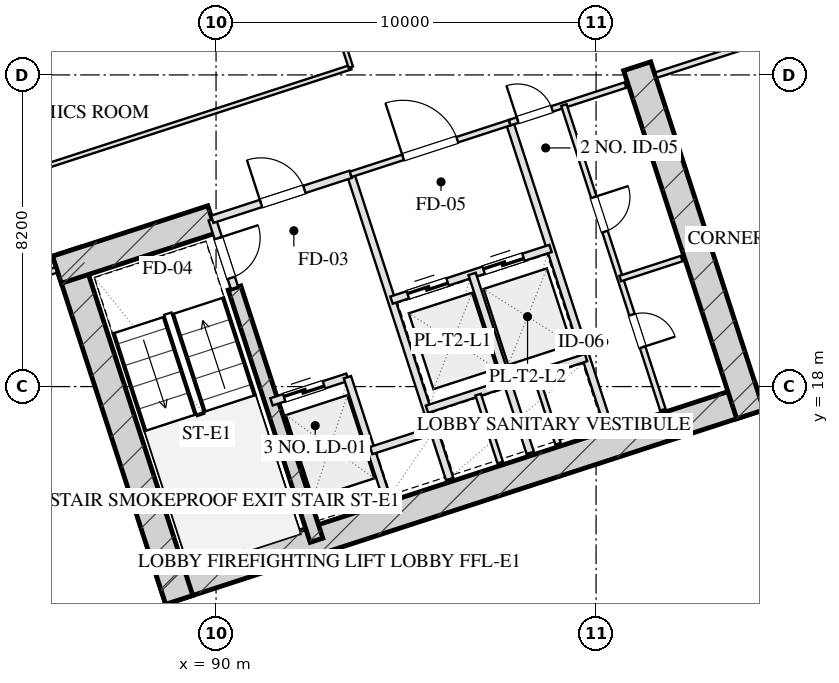
"""IFC4 building model, lengths in metres.
Left out: names, types, materials, properties, quantities, classifications, styles, units other than length and angle.
Written with IfcOpenShell. Run it as: python <this file> out.ifc"""

import sys

from ifc_helpers import new_model, si_unit, direction, frame, frame_2d, origin, place, context, subcontext, project, spatial, rectangle, extrude, element, fill, save


model = new_model("IFC4")
c1 = context("Model", 3, precision=1e-05, world=origin(), true_north=direction((0.0, 1.0)))
c2 = subcontext(c1, "Body", "Model", "MODEL_VIEW")
j1 = project(units=[si_unit("LENGTHUNIT", "METRE"), si_unit("PLANEANGLEUNIT", "RADIAN")], contexts=[c1])
p1 = place(None, origin())
s1 = spatial("IfcSite", under=j1, at=p1, CompositionType="ELEMENT")
p2 = place(p1, origin())
s2 = spatial("IfcBuilding", under=s1, at=p2, CompositionType="ELEMENT")
p3 = place(p2, frame((0.0, 0.0, 88.55)))
s3 = spatial("IfcBuildingStorey", under=s2, at=p3, CompositionType="ELEMENT", Elevation=88.55)
p4 = place(p3, frame((88.559, 12.629, 0.0), z_axis=(0.0, 0.0, 1.0), x_axis=(0.951056072937, 0.309018358888, 0.0)))
e1 = element("IfcWall", 1, at=p4, inside=s3, PredefinedType="SHEAR", context=c2, shape_type="SweptSolid", body=[
    extrude(rectangle(XDim=16.55, YDim=0.75, at=frame_2d((8.275, 0.0))), origin(), (0.0, 0.0, 1.0), 3.45),
])
p5 = place(p3, frame((86.055, 21.546, 0.0), z_axis=(0.0, 0.0, 1.0), x_axis=(0.309023585745, -0.951054374604, 0.0)))
e2 = element("IfcWall", 2, at=p5, inside=s3, PredefinedType="SHEAR", context=c2, shape_type="SweptSolid", body=[
    extrude(rectangle(XDim=9.63, YDim=0.75, at=frame_2d((4.815, 0.0))), origin(), (0.0, 0.0, 1.0), 3.45),
])
p6 = place(p3, frame((101.082, 26.429, 0.0), z_axis=(0.0, 0.0, 1.0), x_axis=(0.309016134813, -0.951056795583, 0.0)))
e3 = element("IfcWall", 3, at=p6, inside=s3, PredefinedType="SHEAR", context=c2, shape_type="SweptSolid", body=[
    extrude(rectangle(XDim=9.63, YDim=0.75, at=frame_2d((4.815, 0.0))), origin(), (0.0, 0.0, 1.0), 3.45),
])
p7 = place(p3, frame((90.486, 20.594, 0.0), z_axis=(0.0, 0.0, 1.0), x_axis=(0.309020428229, -0.951055400562, 0.0)))
e4 = element("IfcWall", 4, at=p7, inside=s3, PredefinedType="SHEAR", context=c2, shape_type="SweptSolid", body=[
    extrude(rectangle(XDim=6.98, YDim=0.35, at=frame_2d((3.49, 0.0))), origin(), (0.0, 0.0, 1.0), 3.45),
])
p8 = place(p3, frame((85.814, 21.074, 0.0), z_axis=(0.0, 0.0, 1.0), x_axis=(0.95106580992, 0.308988390074, 0.0)))
e5 = element("IfcWall", 5, at=p8, inside=s3, PredefinedType="SHEAR", context=c2, shape_type="SweptSolid", body=[
    extrude(rectangle(XDim=4.295, YDim=0.75, at=frame_2d((2.147, 0.0))), origin(), (0.0, 0.0, 1.0), 3.45),
])
p9 = place(p3, frame((99.284, 61.41, 0.0), z_axis=(0.0, 0.0, 1.0), x_axis=(0.309017542002, -0.95105633836, 0.0)))
e6 = element("IfcWall", 6, at=p9, inside=s3, PredefinedType="SOLIDWALL", context=c2, shape_type="SweptSolid", body=[
    extrude(rectangle(XDim=46.4, YDim=0.4, at=frame_2d((23.2, 0.0))), origin(), (0.0, 0.0, 1.0), 2.55),
])
p10 = place(p9, frame((19.4, 0.0, 0.75)))
e7 = element("IfcOpeningElement", 7, at=p10, cuts=e6, PredefinedType="OPENING", context=c2, shape_type="SweptSolid", body=[
    extrude(rectangle(XDim=2.4, YDim=1.4, at=frame_2d((1.2, 0.7))), frame((0.0, 0.21, 0.0), z_axis=(0.0, -1.0, 0.0), x_axis=(1.0, 0.0, 0.0)), (0.0, 0.0, 1.0), 0.42),
])
p11 = place(p9, frame((15.6, 0.0, 0.75)))
e8 = element("IfcOpeningElement", 8, at=p11, cuts=e6, PredefinedType="OPENING", context=c2, shape_type="SweptSolid", body=[
    extrude(rectangle(XDim=2.4, YDim=1.4, at=frame_2d((1.2, 0.7))), frame((0.0, 0.21, 0.0), z_axis=(0.0, -1.0, 0.0), x_axis=(1.0, 0.0, 0.0)), (0.0, 0.0, 1.0), 0.42),
])
p12 = place(p9, frame((27.05, 0.0, 0.0)))
e9 = element("IfcOpeningElement", 9, at=p12, cuts=e6, PredefinedType="OPENING", context=c2, shape_type="SweptSolid", body=[
    extrude(rectangle(XDim=1.1, YDim=2.15, at=frame_2d((0.55, 1.075))), frame((0.0, 0.21, 0.0), z_axis=(0.0, -1.0, 0.0), x_axis=(1.0, 0.0, 0.0)), (0.0, 0.0, 1.0), 0.42),
])
p13 = place(p3, frame((111.953, 14.005, 0.0), z_axis=(0.0, 0.0, 1.0), x_axis=(-0.95105505922, -0.309021478754, 0.0)))
e10 = element("IfcWall", 10, at=p13, inside=s3, PredefinedType="SOLIDWALL", context=c2, shape_type="SweptSolid", body=[
    extrude(rectangle(XDim=29.4, YDim=0.4, at=frame_2d((14.7, 0.0))), origin(), (0.0, 0.0, 1.0), 2.55),
])
p14 = place(p3, frame((89.899, 22.401, 0.0), z_axis=(0.0, 0.0, 1.0), x_axis=(0.308932062672, -0.951084108086, 0.0)))
e11 = element("IfcWall", 11, at=p14, inside=s3, PredefinedType="PARTITIONING", context=c2, shape_type="SweptSolid", body=[
    extrude(rectangle(XDim=1.9, YDim=0.2, at=frame_2d((0.95, 0.0))), origin(), (0.0, 0.0, 1.0), 3.155),
])
p15 = place(p14, frame((0.52, 0.0, 0.0)))
e12 = element("IfcOpeningElement", 12, at=p15, cuts=e11, PredefinedType="OPENING", context=c2, shape_type="SweptSolid", body=[
    extrude(rectangle(XDim=1.1, YDim=2.05, at=frame_2d((0.55, 1.025))), frame((0.0, 0.11, 0.0), z_axis=(0.0, -1.0, 0.0), x_axis=(1.0, 0.0, 0.0)), (0.0, 0.0, 1.0), 0.22),
])
p16 = place(p3, frame((93.542, 23.585, 0.0), z_axis=(0.0, 0.0, 1.0), x_axis=(0.309042196757, -0.951048327176, 0.0)))
e13 = element("IfcWall", 13, at=p16, inside=s3, PredefinedType="PARTITIONING", context=c2, shape_type="SweptSolid", body=[
    extrude(rectangle(XDim=8.43, YDim=0.2, at=frame_2d((4.215, 0.0))), origin(), (0.0, 0.0, 1.0), 3.155),
])
p17 = place(p3, frame((89.899, 22.401, 0.0), z_axis=(0.0, 0.0, 1.0), x_axis=(0.951046716504, 0.309047153403, 0.0)))
e14 = element("IfcWall", 14, at=p17, inside=s3, PredefinedType="PARTITIONING", context=c2, shape_type="SweptSolid", body=[
    extrude(rectangle(XDim=3.83, YDim=0.2, at=frame_2d((1.915, 0.0))), origin(), (0.0, 0.0, 1.0), 3.155),
])
p18 = place(p17, frame((1.35, 0.0, 0.0)))
e15 = element("IfcOpeningElement", 15, at=p18, cuts=e14, PredefinedType="OPENING", context=c2, shape_type="SweptSolid", body=[
    extrude(rectangle(XDim=1.2, YDim=2.05, at=frame_2d((0.6, 1.025))), frame((0.0, 0.11, 0.0), z_axis=(0.0, -1.0, 0.0), x_axis=(1.0, 0.0, 0.0)), (0.0, 0.0, 1.0), 0.22),
])
p19 = place(p3, frame((91.46, 17.598, 0.0), z_axis=(0.0, 0.0, 1.0), x_axis=(0.951062257173, 0.308999325213, 0.0)))
e16 = element("IfcWall", 16, at=p19, inside=s3, PredefinedType="PARTITIONING", context=c2, shape_type="SweptSolid", body=[
    extrude(rectangle(XDim=2.1, YDim=0.2, at=frame_2d((1.05, 0.0))), origin(), (0.0, 0.0, 1.0), 3.155),
])
p20 = place(p19, frame((0.35, 0.0, 0.0)))
e17 = element("IfcOpeningElement", 17, at=p20, cuts=e16, PredefinedType="OPENING", context=c2, shape_type="SweptSolid", body=[
    extrude(rectangle(XDim=1.1, YDim=2.05, at=frame_2d((0.55, 1.025))), frame((0.0, 0.11, 0.0), z_axis=(0.0, -1.0, 0.0), x_axis=(1.0, 0.0, 0.0)), (0.0, 0.0, 1.0), 0.22),
])
p21 = place(p3, frame((93.457, 18.247, 0.0), z_axis=(0.0, 0.0, 1.0), x_axis=(0.3089935693, -0.951064127245, 0.0)))
e18 = element("IfcWall", 18, at=p21, inside=s3, PredefinedType="PARTITIONING", context=c2, shape_type="SweptSolid", body=[
    extrude(rectangle(XDim=3.7, YDim=0.2, at=frame_2d((1.85, 0.0))), origin(), (0.0, 0.0, 1.0), 3.155),
])
p22 = place(p3, frame((94.084, 16.317, 0.0), z_axis=(0.0, 0.0, 1.0), x_axis=(0.951041328149, 0.309063734775, 0.0)))
e19 = element("IfcWall", 19, at=p22, inside=s3, PredefinedType="PARTITIONING", context=c2, shape_type="SweptSolid", body=[
    extrude(rectangle(XDim=1.73, YDim=0.2, at=frame_2d((0.865, 0.0))), origin(), (0.0, 0.0, 1.0), 3.155),
])
p23 = place(p3, frame((97.727, 24.944, 0.0), z_axis=(0.0, 0.0, 1.0), x_axis=(0.309016001439, -0.951056838919, 0.0)))
e20 = element("IfcWall", 20, at=p23, inside=s3, PredefinedType="PARTITIONING", context=c2, shape_type="SweptSolid", body=[
    extrude(rectangle(XDim=8.43, YDim=0.2, at=frame_2d((4.215, 0.0))), origin(), (0.0, 0.0, 1.0), 3.155),
])
p24 = place(p3, frame((93.542, 23.585, 0.0), z_axis=(0.0, 0.0, 1.0), x_axis=(0.951063829732, 0.308994485023, 0.0)))
e21 = element("IfcWall", 21, at=p24, inside=s3, PredefinedType="PARTITIONING", context=c2, shape_type="SweptSolid", body=[
    extrude(rectangle(XDim=4.4, YDim=0.15, at=frame_2d((2.2, 0.0))), origin(), (0.0, 0.0, 1.0), 3.155),
])
p25 = place(p24, frame((1.45, 0.0, 0.0)))
e22 = element("IfcOpeningElement", 22, at=p25, cuts=e21, PredefinedType="OPENING", context=c2, shape_type="SweptSolid", body=[
    extrude(rectangle(XDim=1.5, YDim=2.05, at=frame_2d((0.75, 1.025))), frame((0.0, 0.085, 0.0), z_axis=(0.0, -1.0, 0.0), x_axis=(1.0, 0.0, 0.0)), (0.0, 0.0, 1.0), 0.17),
])
p26 = place(p3, frame((94.617, 20.275, 0.0), z_axis=(0.0, 0.0, 1.0), x_axis=(0.951058531764, 0.30901079133, 0.0)))
e23 = element("IfcWall", 23, at=p26, inside=s3, PredefinedType="PARTITIONING", context=c2, shape_type="SweptSolid", body=[
    extrude(rectangle(XDim=4.4, YDim=0.2, at=frame_2d((2.2, 0.0))), origin(), (0.0, 0.0, 1.0), 3.155),
])
p27 = place(p26, frame((0.45, 0.0, 0.0)))
e24 = element("IfcOpeningElement", 24, at=p27, cuts=e23, PredefinedType="OPENING", context=c2, shape_type="SweptSolid", body=[
    extrude(rectangle(XDim=1.1, YDim=2.05, at=frame_2d((0.55, 1.025))), frame((0.0, 0.11, 0.0), z_axis=(0.0, -1.0, 0.0), x_axis=(1.0, 0.0, 0.0)), (0.0, 0.0, 1.0), 0.22),
])
p28 = place(p26, frame((2.55, 0.0, 0.0)))
e25 = element("IfcOpeningElement", 25, at=p28, cuts=e23, PredefinedType="OPENING", context=c2, shape_type="SweptSolid", body=[
    extrude(rectangle(XDim=1.1, YDim=2.05, at=frame_2d((0.55, 1.025))), frame((0.0, 0.11, 0.0), z_axis=(0.0, -1.0, 0.0), x_axis=(1.0, 0.0, 0.0)), (0.0, 0.0, 1.0), 0.22),
])
p29 = place(p3, frame((96.738, 20.964, 0.0), z_axis=(0.0, 0.0, 1.0), x_axis=(0.309042578481, -0.951048203135, 0.0)))
e26 = element("IfcWall", 26, at=p29, inside=s3, PredefinedType="PARTITIONING", context=c2, shape_type="SweptSolid", body=[
    extrude(rectangle(XDim=4.95, YDim=0.2, at=frame_2d((2.475, 0.0))), origin(), (0.0, 0.0, 1.0), 3.155),
])
p30 = place(p3, frame((95.551, 17.403, 0.0), z_axis=(0.0, 0.0, 1.0), x_axis=(0.951058531764, 0.30901079133, 0.0)))
e27 = element("IfcWall", 27, at=p30, inside=s3, PredefinedType="PARTITIONING", context=c2, shape_type="SweptSolid", body=[
    extrude(rectangle(XDim=4.4, YDim=0.2, at=frame_2d((2.2, 0.0))), origin(), (0.0, 0.0, 1.0), 3.155),
])
p31 = place(p3, frame((96.897, 17.788, 0.0), z_axis=(0.0, 0.0, 1.0), x_axis=(0.30897153969, -0.951071284217, 0.0)))
e28 = element("IfcWall", 28, at=p31, inside=s3, PredefinedType="PARTITIONING", context=c2, shape_type="SweptSolid", body=[
    extrude(rectangle(XDim=1.88, YDim=0.15, at=frame_2d((0.94, 0.0))), origin(), (0.0, 0.0, 1.0), 3.155),
])
p32 = place(p3, frame((98.419, 18.282, 0.0), z_axis=(0.0, 0.0, 1.0), x_axis=(0.308933380006, -0.951083680187, 0.0)))
e29 = element("IfcWall", 29, at=p32, inside=s3, PredefinedType="PARTITIONING", context=c2, shape_type="SweptSolid", body=[
    extrude(rectangle(XDim=1.88, YDim=0.15, at=frame_2d((0.94, 0.0))), origin(), (0.0, 0.0, 1.0), 3.155),
])
p33 = place(p3, frame((97.727, 24.944, 0.0), z_axis=(0.0, 0.0, 1.0), x_axis=(0.951036872128, 0.309077446369, 0.0)))
e30 = element("IfcWall", 30, at=p33, inside=s3, PredefinedType="PARTITIONING", context=c2, shape_type="SweptSolid", body=[
    extrude(rectangle(XDim=3.2, YDim=0.15, at=frame_2d((1.6, 0.0))), origin(), (0.0, 0.0, 1.0), 3.155),
])
p34 = place(p33, frame((0.22, 0.0, 0.0)))
e31 = element("IfcOpeningElement", 31, at=p34, cuts=e30, PredefinedType="OPENING", context=c2, shape_type="SweptSolid", body=[
    extrude(rectangle(XDim=0.95, YDim=2.05, at=frame_2d((0.475, 1.025))), frame((0.0, 0.085, 0.0), z_axis=(0.0, -1.0, 0.0), x_axis=(1.0, 0.0, 0.0)), (0.0, 0.0, 1.0), 0.17),
])
p35 = place(p3, frame((99.153, 25.408, 0.0), z_axis=(0.0, 0.0, 1.0), x_axis=(0.309016001439, -0.951056838919, 0.0)))
e32 = element("IfcWall", 32, at=p35, inside=s3, PredefinedType="PARTITIONING", context=c2, shape_type="SweptSolid", body=[
    extrude(rectangle(XDim=8.43, YDim=0.15, at=frame_2d((4.215, 0.0))), origin(), (0.0, 0.0, 1.0), 3.155),
])
p36 = place(p35, frame((2.55, 0.0, 0.0)))
e33 = element("IfcOpeningElement", 33, at=p36, cuts=e32, PredefinedType="OPENING", context=c2, shape_type="SweptSolid", body=[
    extrude(rectangle(XDim=0.95, YDim=2.05, at=frame_2d((0.475, 1.025))), frame((0.0, 0.085, 0.0), z_axis=(0.0, -1.0, 0.0), x_axis=(1.0, 0.0, 0.0)), (0.0, 0.0, 1.0), 0.17),
])
p37 = place(p35, frame((5.8, 0.0, 0.0)))
e34 = element("IfcOpeningElement", 34, at=p37, cuts=e32, PredefinedType="OPENING", context=c2, shape_type="SweptSolid", body=[
    extrude(rectangle(XDim=0.9, YDim=2.05, at=frame_2d((0.45, 1.025))), frame((0.0, 0.085, 0.0), z_axis=(0.0, -1.0, 0.0), x_axis=(1.0, 0.0, 0.0)), (0.0, 0.0, 1.0), 0.17),
])
p38 = place(p3, frame((100.636, 20.843, 0.0), z_axis=(0.0, 0.0, 1.0), x_axis=(0.951040401051, 0.309066587596, 0.0)))
e35 = element("IfcWall", 35, at=p38, inside=s3, PredefinedType="PARTITIONING", context=c2, shape_type="SweptSolid", body=[
    extrude(rectangle(XDim=1.7, YDim=0.15, at=frame_2d((0.85, 0.0))), origin(), (0.0, 0.0, 1.0), 3.155),
])
p39 = place(p3, frame((77.136, 18.254, 0.0), z_axis=(0.0, 0.0, 1.0), x_axis=(0.951057133767, 0.309015093986, 0.0)))
e36 = element("IfcWall", 36, at=p39, inside=s3, PredefinedType="PARTITIONING", context=c2, shape_type="SweptSolid", body=[
    extrude(rectangle(XDim=9.1, YDim=0.15, at=frame_2d((4.55, 0.0))), origin(), (0.0, 0.0, 1.0), 3.155),
])
p40 = place(p39, frame((3.822, 0.0, 0.0)))
e37 = element("IfcOpeningElement", 37, at=p40, cuts=e36, PredefinedType="OPENING", context=c2, shape_type="SweptSolid", body=[
    extrude(rectangle(XDim=1.0, YDim=2.05, at=frame_2d((0.5, 1.025))), frame((0.0, 0.085, 0.0), z_axis=(0.0, -1.0, 0.0), x_axis=(1.0, 0.0, 0.0)), (0.0, 0.0, 1.0), 0.17),
])
p41 = place(p3, frame((101.578, 26.196, 0.0), z_axis=(0.0, 0.0, 1.0), x_axis=(0.951062770994, 0.308997743729, 0.0)))
e38 = element("IfcWall", 38, at=p41, inside=s3, PredefinedType="PARTITIONING", context=c2, shape_type="SweptSolid", body=[
    extrude(rectangle(XDim=8.5, YDim=0.15, at=frame_2d((4.25, 0.0))), origin(), (0.0, 0.0, 1.0), 3.155),
])
p42 = place(p41, frame((3.57, 0.0, 0.0)))
e39 = element("IfcOpeningElement", 39, at=p42, cuts=e38, PredefinedType="OPENING", context=c2, shape_type="SweptSolid", body=[
    extrude(rectangle(XDim=1.0, YDim=2.05, at=frame_2d((0.5, 1.025))), frame((0.0, 0.085, 0.0), z_axis=(0.0, -1.0, 0.0), x_axis=(1.0, 0.0, 0.0)), (0.0, 0.0, 1.0), 0.17),
])
p43 = place(p3, frame((76.308, 20.803, 0.0), z_axis=(0.0, 0.0, 1.0), x_axis=(0.951054952586, 0.309021806935, 0.0)))
e40 = element("IfcWall", 40, at=p43, inside=s3, PredefinedType="PARTITIONING", context=c2, shape_type="SweptSolid", body=[
    extrude(rectangle(XDim=18.125, YDim=0.12, at=frame_2d((9.062, 0.0))), origin(), (0.0, 0.0, 1.0), 3.155),
])
p44 = place(p3, frame((93.546, 26.404, 0.0), z_axis=(0.0, 0.0, 1.0), x_axis=(-0.309022042254, 0.951054876125, 0.0)))
e41 = element("IfcWall", 41, at=p44, inside=s3, PredefinedType="PARTITIONING", context=c2, shape_type="SweptSolid", body=[
    extrude(rectangle(XDim=16.64, YDim=0.12, at=frame_2d((8.32, 0.0))), origin(), (0.0, 0.0, 1.0), 3.155),
])
p45 = place(p44, frame((1.16, 0.0, 0.0)))
e42 = element("IfcOpeningElement", 42, at=p45, cuts=e41, PredefinedType="OPENING", context=c2, shape_type="SweptSolid", body=[
    extrude(rectangle(XDim=1.0, YDim=2.05, at=frame_2d((0.5, 1.025))), frame((0.0, 0.07, 0.0), z_axis=(0.0, -1.0, 0.0), x_axis=(1.0, 0.0, 0.0)), (0.0, 0.0, 1.0), 0.14),
])
p46 = place(p44, frame((4.72, 0.0, 0.0)))
e43 = element("IfcOpeningElement", 43, at=p46, cuts=e41, PredefinedType="OPENING", context=c2, shape_type="SweptSolid", body=[
    extrude(rectangle(XDim=0.85, YDim=2.05, at=frame_2d((0.425, 1.025))), frame((0.0, 0.07, 0.0), z_axis=(0.0, -1.0, 0.0), x_axis=(1.0, 0.0, 0.0)), (0.0, 0.0, 1.0), 0.14),
])
p47 = place(p44, frame((7.823, 0.0, 0.0)))
e44 = element("IfcOpeningElement", 44, at=p47, cuts=e41, PredefinedType="OPENING", context=c2, shape_type="SweptSolid", body=[
    extrude(rectangle(XDim=1.05, YDim=2.05, at=frame_2d((0.525, 1.025))), frame((0.0, 0.07, 0.0), z_axis=(0.0, -1.0, 0.0), x_axis=(1.0, 0.0, 0.0)), (0.0, 0.0, 1.0), 0.14),
])
p48 = place(p44, frame((10.69, 0.0, 0.0)))
e45 = element("IfcOpeningElement", 45, at=p48, cuts=e41, PredefinedType="OPENING", context=c2, shape_type="SweptSolid", body=[
    extrude(rectangle(XDim=1.0, YDim=2.05, at=frame_2d((0.5, 1.025))), frame((0.0, 0.07, 0.0), z_axis=(0.0, -1.0, 0.0), x_axis=(1.0, 0.0, 0.0)), (0.0, 0.0, 1.0), 0.14),
])
p49 = place(p44, frame((14.247, 0.0, 0.0)))
e46 = element("IfcOpeningElement", 46, at=p49, cuts=e41, PredefinedType="OPENING", context=c2, shape_type="SweptSolid", body=[
    extrude(rectangle(XDim=1.0, YDim=2.05, at=frame_2d((0.5, 1.025))), frame((0.0, 0.07, 0.0), z_axis=(0.0, -1.0, 0.0), x_axis=(1.0, 0.0, 0.0)), (0.0, 0.0, 1.0), 0.14),
])
p50 = place(p3, frame((75.282, 23.96, 0.0), z_axis=(0.0, 0.0, 1.0), x_axis=(0.951054952586, 0.309021806935, 0.0)))
e47 = element("IfcWall", 47, at=p50, inside=s3, PredefinedType="PARTITIONING", context=c2, shape_type="SweptSolid", body=[
    extrude(rectangle(XDim=18.125, YDim=0.12, at=frame_2d((9.062, 0.0))), origin(), (0.0, 0.0, 1.0), 3.155),
])
p51 = place(p15, origin())
e48 = element("IfcDoor", 48, at=p51, inside=s3, OperationType="SINGLE_SWING_LEFT", PredefinedType="DOOR", context=c2, shape_type="SweptSolid", body=[
    extrude(rectangle(XDim=1.1, YDim=2.05, at=frame_2d((0.55, 1.025))), frame((0.0, 0.025, 0.0), z_axis=(0.0, -1.0, 0.0), x_axis=(1.0, 0.0, 0.0)), (0.0, 0.0, 1.0), 0.05),
])
fill(e12, e48)
p52 = place(p18, origin())
e49 = element("IfcDoor", 49, at=p52, inside=s3, OperationType="SINGLE_SWING_LEFT", PredefinedType="DOOR", context=c2, shape_type="SweptSolid", body=[
    extrude(rectangle(XDim=1.2, YDim=2.05, at=frame_2d((0.6, 1.025))), frame((0.0, 0.025, 0.0), z_axis=(0.0, -1.0, 0.0), x_axis=(1.0, 0.0, 0.0)), (0.0, 0.0, 1.0), 0.05),
])
fill(e15, e49)
p53 = place(p20, origin())
e50 = element("IfcDoor", 50, at=p53, inside=s3, OperationType="DOUBLE_DOOR_SLIDING", PredefinedType="DOOR", context=c2, shape_type="SweptSolid", body=[
    extrude(rectangle(XDim=1.1, YDim=2.05, at=frame_2d((0.55, 1.025))), frame((0.0, 0.025, 0.0), z_axis=(0.0, -1.0, 0.0), x_axis=(1.0, 0.0, 0.0)), (0.0, 0.0, 1.0), 0.05),
])
fill(e17, e50)
p54 = place(p25, origin())
e51 = element("IfcDoor", 51, at=p54, inside=s3, OperationType="SINGLE_SWING_LEFT", PredefinedType="DOOR", context=c2, shape_type="SweptSolid", body=[
    extrude(rectangle(XDim=1.5, YDim=2.05, at=frame_2d((0.75, 1.025))), frame((0.0, 0.025, 0.0), z_axis=(0.0, -1.0, 0.0), x_axis=(1.0, 0.0, 0.0)), (0.0, 0.0, 1.0), 0.05),
])
fill(e22, e51)
p55 = place(p27, origin())
e52 = element("IfcDoor", 52, at=p55, inside=s3, OperationType="DOUBLE_DOOR_SLIDING", PredefinedType="DOOR", context=c2, shape_type="SweptSolid", body=[
    extrude(rectangle(XDim=1.1, YDim=2.05, at=frame_2d((0.55, 1.025))), frame((0.0, 0.025, 0.0), z_axis=(0.0, -1.0, 0.0), x_axis=(1.0, 0.0, 0.0)), (0.0, 0.0, 1.0), 0.05),
])
fill(e24, e52)
p56 = place(p28, origin())
e53 = element("IfcDoor", 53, at=p56, inside=s3, OperationType="DOUBLE_DOOR_SLIDING", PredefinedType="DOOR", context=c2, shape_type="SweptSolid", body=[
    extrude(rectangle(XDim=1.1, YDim=2.05, at=frame_2d((0.55, 1.025))), frame((0.0, 0.025, 0.0), z_axis=(0.0, -1.0, 0.0), x_axis=(1.0, 0.0, 0.0)), (0.0, 0.0, 1.0), 0.05),
])
fill(e25, e53)
p57 = place(p34, origin())
e54 = element("IfcDoor", 54, at=p57, inside=s3, OperationType="SINGLE_SWING_LEFT", PredefinedType="DOOR", context=c2, shape_type="SweptSolid", body=[
    extrude(rectangle(XDim=0.95, YDim=2.05, at=frame_2d((0.475, 1.025))), frame((0.0, 0.025, 0.0), z_axis=(0.0, -1.0, 0.0), x_axis=(1.0, 0.0, 0.0)), (0.0, 0.0, 1.0), 0.05),
])
fill(e31, e54)
p58 = place(p36, origin())
e55 = element("IfcDoor", 55, at=p58, inside=s3, OperationType="SINGLE_SWING_LEFT", PredefinedType="DOOR", context=c2, shape_type="SweptSolid", body=[
    extrude(rectangle(XDim=0.95, YDim=2.05, at=frame_2d((0.475, 1.025))), frame((0.0, 0.025, 0.0), z_axis=(0.0, -1.0, 0.0), x_axis=(1.0, 0.0, 0.0)), (0.0, 0.0, 1.0), 0.05),
])
fill(e33, e55)
p59 = place(p37, origin())
e56 = element("IfcDoor", 56, at=p59, inside=s3, OperationType="SINGLE_SWING_RIGHT", PredefinedType="DOOR", context=c2, shape_type="SweptSolid", body=[
    extrude(rectangle(XDim=0.9, YDim=2.05, at=frame_2d((0.45, 1.025))), frame((0.0, 0.025, 0.0), z_axis=(0.0, -1.0, 0.0), x_axis=(1.0, 0.0, 0.0)), (0.0, 0.0, 1.0), 0.05),
])
fill(e34, e56)
save(model, sys.argv[1])
